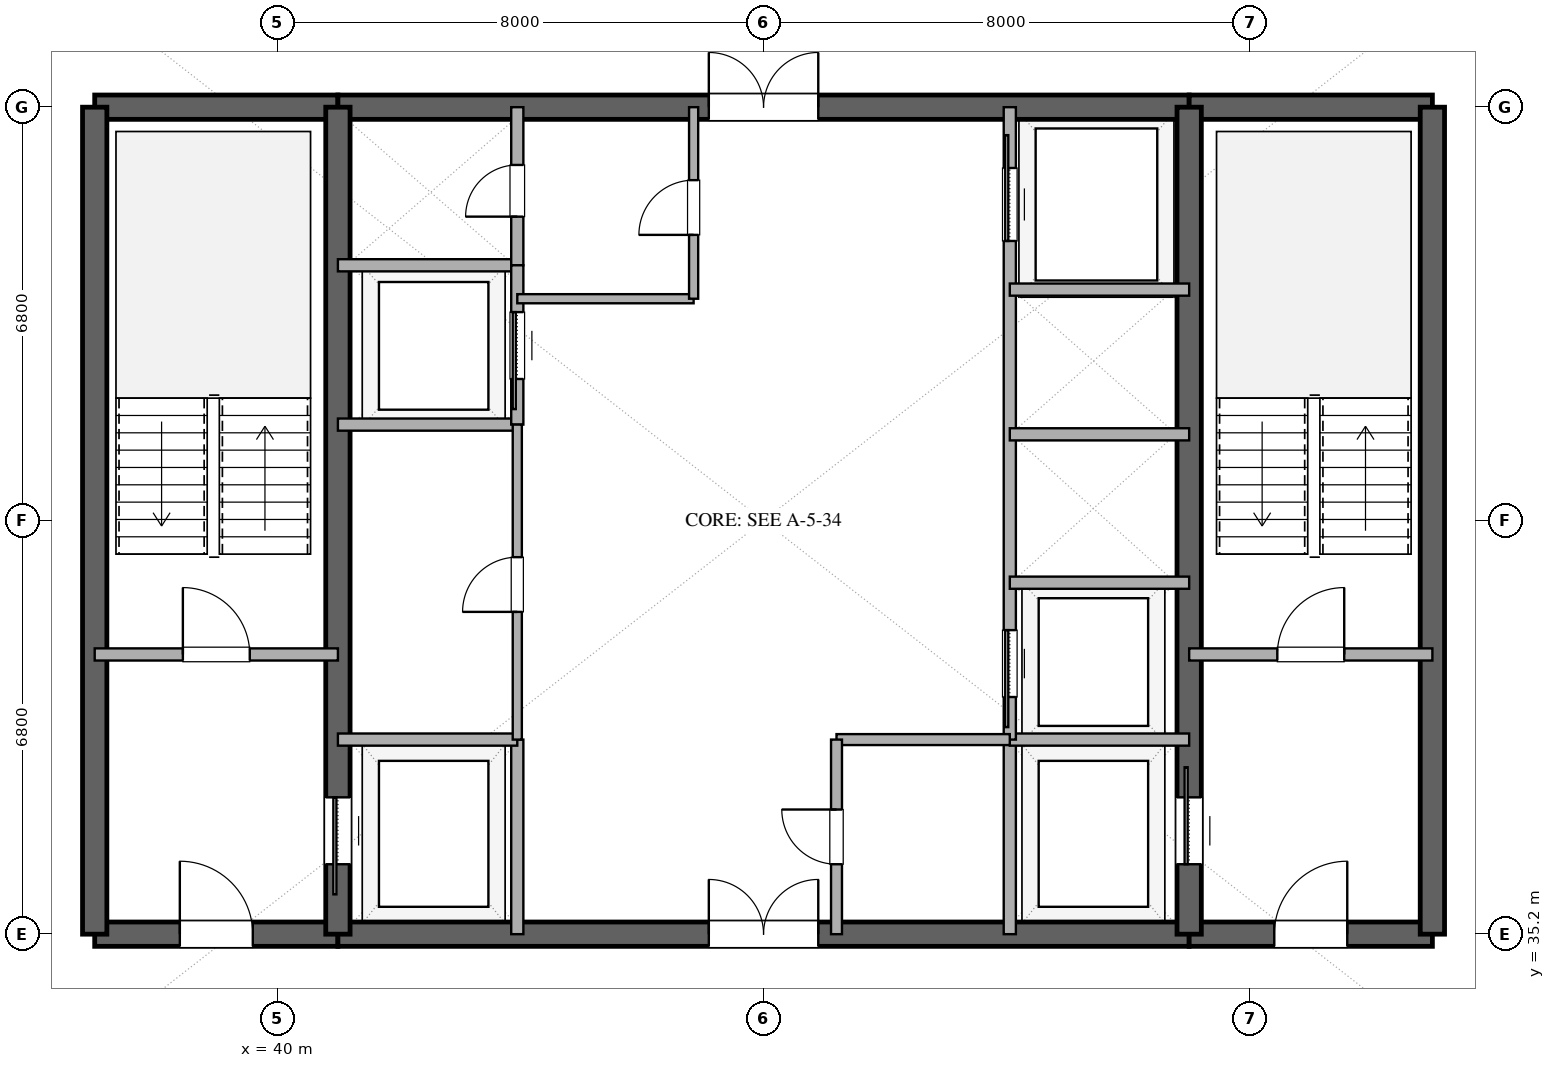
"""IFC4 building model, lengths in metres.
Left out: names, types, materials, properties, quantities, classifications, styles, units other than length and angle.
Written with IfcOpenShell. Run it as: python <this file> out.ifc"""

import sys

from ifc_helpers import new_model, si_unit, direction, frame, frame_2d, origin, place, context, subcontext, project, spatial, rectangle, extrude, element, fill, save


model = new_model("IFC4")
c1 = context("Model", 3, precision=1e-05, world=origin(), true_north=direction((0.0, 1.0)))
c2 = subcontext(c1, "Body", "Model", "MODEL_VIEW")
j1 = project(units=[si_unit("LENGTHUNIT", "METRE"), si_unit("PLANEANGLEUNIT", "RADIAN")], contexts=[c1])
p1 = place(None, origin())
s1 = spatial("IfcSite", under=j1, at=p1, CompositionType="ELEMENT")
p2 = place(p1, origin())
s2 = spatial("IfcBuilding", under=s1, at=p2, CompositionType="ELEMENT")
p3 = place(p2, frame((0.0, 0.0, 231.6)))
s3 = spatial("IfcBuildingStorey", under=s2, at=p3, CompositionType="ELEMENT", Elevation=231.6)
p4 = place(p3, frame((37.0, 35.2, 0.0), z_axis=(0.0, 0.0, 1.0), x_axis=(1.0, 0.0, 0.0)))
e1 = element("IfcWall", 1, at=p4, inside=s3, PredefinedType="SHEAR", context=c2, shape_type="SweptSolid", body=[
    extrude(rectangle(XDim=4.0, YDim=0.4, at=frame_2d((2.0, 0.0))), origin(), (0.0, 0.0, 1.0), 3.36),
])
p5 = place(p4, frame((1.4, 0.0, 0.0)))
e2 = element("IfcOpeningElement", 2, at=p5, cuts=e1, PredefinedType="OPENING", context=c2, shape_type="SweptSolid", body=[
    extrude(rectangle(XDim=1.2, YDim=2.15, at=frame_2d((0.6, 1.075))), frame((0.0, 0.21, 0.0), z_axis=(0.0, -1.0, 0.0), x_axis=(1.0, 0.0, 0.0)), (0.0, 0.0, 1.0), 0.42),
])
p6 = place(p3, frame((41.0, 35.2, 0.0), z_axis=(0.0, 0.0, 1.0), x_axis=(1.0, 0.0, 0.0)))
e3 = element("IfcWall", 3, at=p6, inside=s3, PredefinedType="SHEAR", context=c2, shape_type="SweptSolid", body=[
    extrude(rectangle(XDim=14.0, YDim=0.4, at=frame_2d((7.0, 0.0))), origin(), (0.0, 0.0, 1.0), 3.36),
])
p7 = place(p6, frame((6.1, 0.0, 0.0)))
e4 = element("IfcOpeningElement", 4, at=p7, cuts=e3, PredefinedType="OPENING", context=c2, shape_type="SweptSolid", body=[
    extrude(rectangle(XDim=1.8, YDim=2.25, at=frame_2d((0.9, 1.125))), frame((0.0, 0.21, 0.0), z_axis=(0.0, -1.0, 0.0), x_axis=(1.0, 0.0, 0.0)), (0.0, 0.0, 1.0), 0.42),
])
p8 = place(p3, frame((55.0, 35.2, 0.0), z_axis=(0.0, 0.0, 1.0), x_axis=(1.0, 0.0, 0.0)))
e5 = element("IfcWall", 5, at=p8, inside=s3, PredefinedType="SHEAR", context=c2, shape_type="SweptSolid", body=[
    extrude(rectangle(XDim=4.0, YDim=0.4, at=frame_2d((2.0, 0.0))), origin(), (0.0, 0.0, 1.0), 3.36),
])
p9 = place(p8, frame((1.4, 0.0, 0.0)))
e6 = element("IfcOpeningElement", 6, at=p9, cuts=e5, PredefinedType="OPENING", context=c2, shape_type="SweptSolid", body=[
    extrude(rectangle(XDim=1.2, YDim=2.15, at=frame_2d((0.6, 1.075))), frame((0.0, 0.21, 0.0), z_axis=(0.0, -1.0, 0.0), x_axis=(1.0, 0.0, 0.0)), (0.0, 0.0, 1.0), 0.42),
])
p10 = place(p3, frame((37.0, 48.8, 0.0), z_axis=(0.0, 0.0, 1.0), x_axis=(1.0, 0.0, 0.0)))
e7 = element("IfcWall", 7, at=p10, inside=s3, PredefinedType="SHEAR", context=c2, shape_type="SweptSolid", body=[
    extrude(rectangle(XDim=4.0, YDim=0.4, at=frame_2d((2.0, 0.0))), origin(), (0.0, 0.0, 1.0), 3.36),
])
p11 = place(p3, frame((41.0, 48.8, 0.0), z_axis=(0.0, 0.0, 1.0), x_axis=(1.0, 0.0, 0.0)))
e8 = element("IfcWall", 8, at=p11, inside=s3, PredefinedType="SHEAR", context=c2, shape_type="SweptSolid", body=[
    extrude(rectangle(XDim=14.0, YDim=0.4, at=frame_2d((7.0, 0.0))), origin(), (0.0, 0.0, 1.0), 3.36),
])
p12 = place(p11, frame((6.1, 0.0, 0.0)))
e9 = element("IfcOpeningElement", 9, at=p12, cuts=e8, PredefinedType="OPENING", context=c2, shape_type="SweptSolid", body=[
    extrude(rectangle(XDim=1.8, YDim=2.25, at=frame_2d((0.9, 1.125))), frame((0.0, 0.21, 0.0), z_axis=(0.0, -1.0, 0.0), x_axis=(1.0, 0.0, 0.0)), (0.0, 0.0, 1.0), 0.42),
])
p13 = place(p3, frame((55.0, 48.8, 0.0), z_axis=(0.0, 0.0, 1.0), x_axis=(1.0, 0.0, 0.0)))
e10 = element("IfcWall", 10, at=p13, inside=s3, PredefinedType="SHEAR", context=c2, shape_type="SweptSolid", body=[
    extrude(rectangle(XDim=4.0, YDim=0.4, at=frame_2d((2.0, 0.0))), origin(), (0.0, 0.0, 1.0), 3.36),
])
for number, where, z_axis, x_axis in (
    (11, (37.0, 35.2, 0.0), (0.0, 0.0, 1.0), (0.0, 1.0, 0.0)),
    (12, (59.0, 35.2, 0.0), (0.0, 0.0, 1.0), (0.0, 1.0, 0.0)),
):
    element("IfcWall", number, at=place(p3, frame(where, z_axis=z_axis, x_axis=x_axis)), inside=s3, PredefinedType="SHEAR", context=c2, shape_type="SweptSolid", body=[
        extrude(rectangle(XDim=13.6, YDim=0.4, at=frame_2d((6.8, 0.0))), origin(), (0.0, 0.0, 1.0), 3.36),
    ])
p14 = place(p3, frame((41.0, 35.2, 0.0), z_axis=(0.0, 0.0, 1.0), x_axis=(0.0, 1.0, 0.0)))
e13 = element("IfcWall", 13, at=p14, inside=s3, PredefinedType="SHEAR", context=c2, shape_type="SweptSolid", body=[
    extrude(rectangle(XDim=13.6, YDim=0.4, at=frame_2d((6.8, 0.0))), origin(), (0.0, 0.0, 1.0), 3.36),
])
p15 = place(p14, frame((1.15, 0.0, 0.0)))
e14 = element("IfcOpeningElement", 14, at=p15, cuts=e13, PredefinedType="OPENING", context=c2, shape_type="SweptSolid", body=[
    extrude(rectangle(XDim=1.1, YDim=2.2, at=frame_2d((0.55, 1.1))), frame((0.0, 0.21, 0.0), z_axis=(0.0, -1.0, 0.0), x_axis=(1.0, 0.0, 0.0)), (0.0, 0.0, 1.0), 0.42),
])
p16 = place(p3, frame((55.0, 35.2, 0.0), z_axis=(0.0, 0.0, 1.0), x_axis=(0.0, 1.0, 0.0)))
e15 = element("IfcWall", 15, at=p16, inside=s3, PredefinedType="SHEAR", context=c2, shape_type="SweptSolid", body=[
    extrude(rectangle(XDim=13.6, YDim=0.4, at=frame_2d((6.8, 0.0))), origin(), (0.0, 0.0, 1.0), 3.36),
])
p17 = place(p16, frame((1.15, 0.0, 0.0)))
e16 = element("IfcOpeningElement", 16, at=p17, cuts=e15, PredefinedType="OPENING", context=c2, shape_type="SweptSolid", body=[
    extrude(rectangle(XDim=1.1, YDim=2.2, at=frame_2d((0.55, 1.1))), frame((0.0, 0.21, 0.0), z_axis=(0.0, -1.0, 0.0), x_axis=(1.0, 0.0, 0.0)), (0.0, 0.0, 1.0), 0.42),
])
p18 = place(p3, frame((37.0, 39.8, 0.0), z_axis=(0.0, 0.0, 1.0), x_axis=(1.0, 0.0, 0.0)))
e17 = element("IfcWall", 17, at=p18, inside=s3, PredefinedType="SOLIDWALL", context=c2, shape_type="SweptSolid", body=[
    extrude(rectangle(XDim=4.0, YDim=0.2, at=frame_2d((2.0, 0.0))), origin(), (0.0, 0.0, 1.0), 2.72),
])
p19 = place(p18, frame((1.45, 0.0, 0.0)))
e18 = element("IfcOpeningElement", 18, at=p19, cuts=e17, PredefinedType="OPENING", context=c2, shape_type="SweptSolid", body=[
    extrude(rectangle(XDim=1.1, YDim=2.15, at=frame_2d((0.55, 1.075))), frame((0.0, 0.11, 0.0), z_axis=(0.0, -1.0, 0.0), x_axis=(1.0, 0.0, 0.0)), (0.0, 0.0, 1.0), 0.22),
])
p20 = place(p3, frame((55.0, 39.8, 0.0), z_axis=(0.0, 0.0, 1.0), x_axis=(1.0, 0.0, 0.0)))
e19 = element("IfcWall", 19, at=p20, inside=s3, PredefinedType="SOLIDWALL", context=c2, shape_type="SweptSolid", body=[
    extrude(rectangle(XDim=4.0, YDim=0.2, at=frame_2d((2.0, 0.0))), origin(), (0.0, 0.0, 1.0), 2.72),
])
p21 = place(p20, frame((1.45, 0.0, 0.0)))
e20 = element("IfcOpeningElement", 20, at=p21, cuts=e19, PredefinedType="OPENING", context=c2, shape_type="SweptSolid", body=[
    extrude(rectangle(XDim=1.1, YDim=2.15, at=frame_2d((0.55, 1.075))), frame((0.0, 0.11, 0.0), z_axis=(0.0, -1.0, 0.0), x_axis=(1.0, 0.0, 0.0)), (0.0, 0.0, 1.0), 0.22),
])
p22 = place(p3, frame((43.95, 35.2, 0.0), z_axis=(0.0, 0.0, 1.0), x_axis=(0.0, 1.0, 0.0)))
e21 = element("IfcWall", 21, at=p22, inside=s3, PredefinedType="SOLIDWALL", context=c2, shape_type="SweptSolid", body=[
    extrude(rectangle(XDim=3.2, YDim=0.2, at=frame_2d((1.6, 0.0))), origin(), (0.0, 0.0, 1.0), 2.72),
])
p23 = place(p3, frame((41.0, 38.4, 0.0), z_axis=(0.0, 0.0, 1.0), x_axis=(1.0, 0.0, 0.0)))
e22 = element("IfcWall", 22, at=p23, inside=s3, PredefinedType="SOLIDWALL", context=c2, shape_type="SweptSolid", body=[
    extrude(rectangle(XDim=2.95, YDim=0.2, at=frame_2d((1.475, 0.0))), origin(), (0.0, 0.0, 1.0), 2.72),
])
p24 = place(p3, frame((52.05, 35.2, 0.0), z_axis=(0.0, 0.0, 1.0), x_axis=(0.0, 1.0, 0.0)))
e23 = element("IfcWall", 23, at=p24, inside=s3, PredefinedType="SOLIDWALL", context=c2, shape_type="SweptSolid", body=[
    extrude(rectangle(XDim=3.2, YDim=0.2, at=frame_2d((1.6, 0.0))), origin(), (0.0, 0.0, 1.0), 2.72),
])
for number, where, z_axis, x_axis in (
    (24, (52.05, 38.4, 0.0), (0.0, 0.0, 1.0), (1.0, 0.0, 0.0)),
    (25, (41.0, 46.2, 0.0), (0.0, 0.0, 1.0), (1.0, 0.0, 0.0)),
):
    element("IfcWall", number, at=place(p3, frame(where, z_axis=z_axis, x_axis=x_axis)), inside=s3, PredefinedType="SOLIDWALL", context=c2, shape_type="SweptSolid", body=[
        extrude(rectangle(XDim=2.95, YDim=0.2, at=frame_2d((1.475, 0.0))), origin(), (0.0, 0.0, 1.0), 2.72),
    ])
p25 = place(p3, frame((43.95, 46.2, 0.0), z_axis=(0.0, 0.0, 1.0), x_axis=(0.0, 1.0, 0.0)))
e26 = element("IfcWall", 26, at=p25, inside=s3, PredefinedType="SOLIDWALL", context=c2, shape_type="SweptSolid", body=[
    extrude(rectangle(XDim=2.6, YDim=0.2, at=frame_2d((1.3, 0.0))), origin(), (0.0, 0.0, 1.0), 2.72),
])
p26 = place(p25, frame((0.8, 0.0, 0.0)))
e27 = element("IfcOpeningElement", 27, at=p26, cuts=e26, PredefinedType="OPENING", context=c2, shape_type="SweptSolid", body=[
    extrude(rectangle(XDim=0.85, YDim=2.15, at=frame_2d((0.425, 1.075))), frame((0.0, 0.11, 0.0), z_axis=(0.0, -1.0, 0.0), x_axis=(1.0, 0.0, 0.0)), (0.0, 0.0, 1.0), 0.22),
])
p27 = place(p3, frame((41.0, 43.58, 0.0), z_axis=(0.0, 0.0, 1.0), x_axis=(1.0, 0.0, 0.0)))
e28 = element("IfcWall", 28, at=p27, inside=s3, PredefinedType="SOLIDWALL", context=c2, shape_type="SweptSolid", body=[
    extrude(rectangle(XDim=2.95, YDim=0.2, at=frame_2d((1.475, 0.0))), origin(), (0.0, 0.0, 1.0), 2.72),
])
p28 = place(p3, frame((43.95, 43.58, 0.0), z_axis=(0.0, 0.0, 1.0), x_axis=(0.0, 1.0, 0.0)))
e29 = element("IfcWall", 29, at=p28, inside=s3, PredefinedType="SOLIDWALL", context=c2, shape_type="SweptSolid", body=[
    extrude(rectangle(XDim=2.62, YDim=0.2, at=frame_2d((1.31, 0.0))), origin(), (0.0, 0.0, 1.0), 2.72),
])
p29 = place(p28, frame((0.75, 0.0, 0.0)))
e30 = element("IfcOpeningElement", 30, at=p29, cuts=e29, PredefinedType="OPENING", context=c2, shape_type="SweptSolid", body=[
    extrude(rectangle(XDim=1.1, YDim=2.2, at=frame_2d((0.55, 1.1))), frame((0.0, 0.11, 0.0), z_axis=(0.0, -1.0, 0.0), x_axis=(1.0, 0.0, 0.0)), (0.0, 0.0, 1.0), 0.22),
])
p30 = place(p3, frame((43.95, 38.4, 0.0), z_axis=(0.0, 0.0, 1.0), x_axis=(0.0, 1.0, 0.0)))
e31 = element("IfcWall", 31, at=p30, inside=s3, PredefinedType="PARTITIONING", context=c2, shape_type="SweptSolid", body=[
    extrude(rectangle(XDim=5.18, YDim=0.15, at=frame_2d((2.59, 0.0))), origin(), (0.0, 0.0, 1.0), 2.72),
])
p31 = place(p30, frame((2.1, 0.0, 0.0)))
e32 = element("IfcOpeningElement", 32, at=p31, cuts=e31, PredefinedType="OPENING", context=c2, shape_type="SweptSolid", body=[
    extrude(rectangle(XDim=0.9, YDim=2.15, at=frame_2d((0.45, 1.075))), frame((0.0, 0.085, 0.0), z_axis=(0.0, -1.0, 0.0), x_axis=(1.0, 0.0, 0.0)), (0.0, 0.0, 1.0), 0.17),
])
p32 = place(p3, frame((52.05, 38.4, 0.0), z_axis=(0.0, 0.0, 1.0), x_axis=(0.0, 1.0, 0.0)))
e33 = element("IfcWall", 33, at=p32, inside=s3, PredefinedType="SOLIDWALL", context=c2, shape_type="SweptSolid", body=[
    extrude(rectangle(XDim=10.4, YDim=0.2, at=frame_2d((5.2, 0.0))), origin(), (0.0, 0.0, 1.0), 2.72),
])
p33 = place(p32, frame((0.7, 0.0, 0.0)))
e34 = element("IfcOpeningElement", 34, at=p33, cuts=e33, PredefinedType="OPENING", context=c2, shape_type="SweptSolid", body=[
    extrude(rectangle(XDim=1.1, YDim=2.2, at=frame_2d((0.55, 1.1))), frame((0.0, 0.11, 0.0), z_axis=(0.0, -1.0, 0.0), x_axis=(1.0, 0.0, 0.0)), (0.0, 0.0, 1.0), 0.22),
])
p34 = place(p32, frame((8.2, 0.0, 0.0)))
e35 = element("IfcOpeningElement", 35, at=p34, cuts=e33, PredefinedType="OPENING", context=c2, shape_type="SweptSolid", body=[
    extrude(rectangle(XDim=1.2, YDim=2.2, at=frame_2d((0.6, 1.1))), frame((0.0, 0.11, 0.0), z_axis=(0.0, -1.0, 0.0), x_axis=(1.0, 0.0, 0.0)), (0.0, 0.0, 1.0), 0.22),
])
for number, where, z_axis, x_axis in (
    (36, (52.05, 40.98, 0.0), (0.0, 0.0, 1.0), (1.0, 0.0, 0.0)),
    (37, (52.05, 43.42, 0.0), (0.0, 0.0, 1.0), (1.0, 0.0, 0.0)),
    (38, (52.05, 45.8, 0.0), (0.0, 0.0, 1.0), (1.0, 0.0, 0.0)),
):
    element("IfcWall", number, at=place(p3, frame(where, z_axis=z_axis, x_axis=x_axis)), inside=s3, PredefinedType="SOLIDWALL", context=c2, shape_type="SweptSolid", body=[
        extrude(rectangle(XDim=2.95, YDim=0.2, at=frame_2d((1.475, 0.0))), origin(), (0.0, 0.0, 1.0), 2.72),
    ])
p35 = place(p3, frame((43.95, 45.65, 0.0), z_axis=(0.0, 0.0, 1.0), x_axis=(1.0, 0.0, 0.0)))
e39 = element("IfcWall", 39, at=p35, inside=s3, PredefinedType="PARTITIONING", context=c2, shape_type="SweptSolid", body=[
    extrude(rectangle(XDim=2.9, YDim=0.15, at=frame_2d((1.45, 0.0))), origin(), (0.0, 0.0, 1.0), 2.72),
])
p36 = place(p3, frame((46.85, 45.65, 0.0), z_axis=(0.0, 0.0, 1.0), x_axis=(0.0, 1.0, 0.0)))
e40 = element("IfcWall", 40, at=p36, inside=s3, PredefinedType="PARTITIONING", context=c2, shape_type="SweptSolid", body=[
    extrude(rectangle(XDim=3.15, YDim=0.15, at=frame_2d((1.575, 0.0))), origin(), (0.0, 0.0, 1.0), 2.72),
])
p37 = place(p36, frame((1.05, 0.0, 0.0)))
e41 = element("IfcOpeningElement", 41, at=p37, cuts=e40, PredefinedType="OPENING", context=c2, shape_type="SweptSolid", body=[
    extrude(rectangle(XDim=0.9, YDim=2.15, at=frame_2d((0.45, 1.075))), frame((0.0, 0.085, 0.0), z_axis=(0.0, -1.0, 0.0), x_axis=(1.0, 0.0, 0.0)), (0.0, 0.0, 1.0), 0.17),
])
p38 = place(p3, frame((49.2, 38.4, 0.0), z_axis=(0.0, 0.0, 1.0), x_axis=(1.0, 0.0, 0.0)))
e42 = element("IfcWall", 42, at=p38, inside=s3, PredefinedType="PLUMBINGWALL", context=c2, shape_type="SweptSolid", body=[
    extrude(rectangle(XDim=2.85, YDim=0.18, at=frame_2d((1.425, 0.0))), origin(), (0.0, 0.0, 1.0), 2.72),
])
p39 = place(p3, frame((49.2, 35.2, 0.0), z_axis=(0.0, 0.0, 1.0), x_axis=(0.0, 1.0, 0.0)))
e43 = element("IfcWall", 43, at=p39, inside=s3, PredefinedType="PLUMBINGWALL", context=c2, shape_type="SweptSolid", body=[
    extrude(rectangle(XDim=3.2, YDim=0.18, at=frame_2d((1.6, 0.0))), origin(), (0.0, 0.0, 1.0), 2.72),
])
p40 = place(p39, frame((1.15, 0.0, 0.0)))
e44 = element("IfcOpeningElement", 44, at=p40, cuts=e43, PredefinedType="OPENING", context=c2, shape_type="SweptSolid", body=[
    extrude(rectangle(XDim=0.9, YDim=2.1, at=frame_2d((0.45, 1.05))), frame((0.0, 0.1, 0.0), z_axis=(0.0, -1.0, 0.0), x_axis=(1.0, 0.0, 0.0)), (0.0, 0.0, 1.0), 0.2),
])
p41 = place(p15, origin())
e45 = element("IfcDoor", 45, at=p41, inside=s3, OperationType="SLIDING_TO_LEFT", PredefinedType="DOOR", context=c2, shape_type="SweptSolid", body=[
    extrude(rectangle(XDim=1.1, YDim=2.2, at=frame_2d((0.55, 1.1))), frame((0.0, 0.025, 0.0), z_axis=(0.0, -1.0, 0.0), x_axis=(1.0, 0.0, 0.0)), (0.0, 0.0, 1.0), 0.05),
])
fill(e14, e45)
p42 = place(p17, origin())
e46 = element("IfcDoor", 46, at=p42, inside=s3, OperationType="SLIDING_TO_RIGHT", PredefinedType="DOOR", context=c2, shape_type="SweptSolid", body=[
    extrude(rectangle(XDim=1.1, YDim=2.2, at=frame_2d((0.55, 1.1))), frame((0.0, 0.025, 0.0), z_axis=(0.0, -1.0, 0.0), x_axis=(1.0, 0.0, 0.0)), (0.0, 0.0, 1.0), 0.05),
])
fill(e16, e46)
p43 = place(p5, origin())
e47 = element("IfcDoor", 47, at=p43, inside=s3, OperationType="SINGLE_SWING_LEFT", PredefinedType="DOOR", context=c2, shape_type="SweptSolid", body=[
    extrude(rectangle(XDim=1.2, YDim=2.15, at=frame_2d((0.6, 1.075))), frame((0.0, 0.025, 0.0), z_axis=(0.0, -1.0, 0.0), x_axis=(1.0, 0.0, 0.0)), (0.0, 0.0, 1.0), 0.05),
])
fill(e2, e47)
p44 = place(p9, origin())
e48 = element("IfcDoor", 48, at=p44, inside=s3, OperationType="SINGLE_SWING_RIGHT", PredefinedType="DOOR", context=c2, shape_type="SweptSolid", body=[
    extrude(rectangle(XDim=1.2, YDim=2.15, at=frame_2d((0.6, 1.075))), frame((0.0, 0.025, 0.0), z_axis=(0.0, -1.0, 0.0), x_axis=(1.0, 0.0, 0.0)), (0.0, 0.0, 1.0), 0.05),
])
fill(e6, e48)
p45 = place(p7, origin())
e49 = element("IfcDoor", 49, at=p45, inside=s3, OperationType="DOUBLE_DOOR_SINGLE_SWING", PredefinedType="DOOR", context=c2, shape_type="SweptSolid", body=[
    extrude(rectangle(XDim=1.8, YDim=2.25, at=frame_2d((0.9, 1.125))), frame((0.0, 0.025, 0.0), z_axis=(0.0, -1.0, 0.0), x_axis=(1.0, 0.0, 0.0)), (0.0, 0.0, 1.0), 0.05),
])
fill(e4, e49)
p46 = place(p12, origin())
e50 = element("IfcDoor", 50, at=p46, inside=s3, OperationType="DOUBLE_DOOR_SINGLE_SWING", PredefinedType="DOOR", context=c2, shape_type="SweptSolid", body=[
    extrude(rectangle(XDim=1.8, YDim=2.25, at=frame_2d((0.9, 1.125))), frame((0.0, 0.025, 0.0), z_axis=(0.0, -1.0, 0.0), x_axis=(1.0, 0.0, 0.0)), (0.0, 0.0, 1.0), 0.05),
])
fill(e9, e50)
p47 = place(p19, origin())
e51 = element("IfcDoor", 51, at=p47, inside=s3, OperationType="SINGLE_SWING_LEFT", PredefinedType="DOOR", context=c2, shape_type="SweptSolid", body=[
    extrude(rectangle(XDim=1.1, YDim=2.15, at=frame_2d((0.55, 1.075))), frame((0.0, 0.025, 0.0), z_axis=(0.0, -1.0, 0.0), x_axis=(1.0, 0.0, 0.0)), (0.0, 0.0, 1.0), 0.05),
])
fill(e18, e51)
p48 = place(p21, origin())
e52 = element("IfcDoor", 52, at=p48, inside=s3, OperationType="SINGLE_SWING_RIGHT", PredefinedType="DOOR", context=c2, shape_type="SweptSolid", body=[
    extrude(rectangle(XDim=1.1, YDim=2.15, at=frame_2d((0.55, 1.075))), frame((0.0, 0.025, 0.0), z_axis=(0.0, -1.0, 0.0), x_axis=(1.0, 0.0, 0.0)), (0.0, 0.0, 1.0), 0.05),
])
fill(e20, e52)
p49 = place(p26, origin())
e53 = element("IfcDoor", 53, at=p49, inside=s3, OperationType="SINGLE_SWING_LEFT", PredefinedType="DOOR", context=c2, shape_type="SweptSolid", body=[
    extrude(rectangle(XDim=0.85, YDim=2.15, at=frame_2d((0.425, 1.075))), frame((0.0, 0.025, 0.0), z_axis=(0.0, -1.0, 0.0), x_axis=(1.0, 0.0, 0.0)), (0.0, 0.0, 1.0), 0.05),
])
fill(e27, e53)
p50 = place(p29, origin())
e54 = element("IfcDoor", 54, at=p50, inside=s3, OperationType="SLIDING_TO_LEFT", PredefinedType="DOOR", context=c2, shape_type="SweptSolid", body=[
    extrude(rectangle(XDim=1.1, YDim=2.2, at=frame_2d((0.55, 1.1))), frame((0.0, 0.025, 0.0), z_axis=(0.0, -1.0, 0.0), x_axis=(1.0, 0.0, 0.0)), (0.0, 0.0, 1.0), 0.05),
])
fill(e30, e54)
p51 = place(p31, origin())
e55 = element("IfcDoor", 55, at=p51, inside=s3, OperationType="SINGLE_SWING_LEFT", PredefinedType="DOOR", context=c2, shape_type="SweptSolid", body=[
    extrude(rectangle(XDim=0.9, YDim=2.15, at=frame_2d((0.45, 1.075))), frame((0.0, 0.025, 0.0), z_axis=(0.0, -1.0, 0.0), x_axis=(1.0, 0.0, 0.0)), (0.0, 0.0, 1.0), 0.05),
])
fill(e32, e55)
p52 = place(p33, origin())
e56 = element("IfcDoor", 56, at=p52, inside=s3, OperationType="SLIDING_TO_LEFT", PredefinedType="DOOR", context=c2, shape_type="SweptSolid", body=[
    extrude(rectangle(XDim=1.1, YDim=2.2, at=frame_2d((0.55, 1.1))), frame((0.0, 0.025, 0.0), z_axis=(0.0, -1.0, 0.0), x_axis=(1.0, 0.0, 0.0)), (0.0, 0.0, 1.0), 0.05),
])
fill(e34, e56)
p53 = place(p34, origin())
e57 = element("IfcDoor", 57, at=p53, inside=s3, OperationType="SLIDING_TO_RIGHT", PredefinedType="DOOR", context=c2, shape_type="SweptSolid", body=[
    extrude(rectangle(XDim=1.2, YDim=2.2, at=frame_2d((0.6, 1.1))), frame((0.0, 0.025, 0.0), z_axis=(0.0, -1.0, 0.0), x_axis=(1.0, 0.0, 0.0)), (0.0, 0.0, 1.0), 0.05),
])
fill(e35, e57)
p54 = place(p37, origin())
e58 = element("IfcDoor", 58, at=p54, inside=s3, OperationType="SINGLE_SWING_LEFT", PredefinedType="DOOR", context=c2, shape_type="SweptSolid", body=[
    extrude(rectangle(XDim=0.9, YDim=2.15, at=frame_2d((0.45, 1.075))), frame((0.0, 0.025, 0.0), z_axis=(0.0, -1.0, 0.0), x_axis=(1.0, 0.0, 0.0)), (0.0, 0.0, 1.0), 0.05),
])
fill(e41, e58)
p55 = place(p40, origin())
e59 = element("IfcDoor", 59, at=p55, inside=s3, OperationType="SINGLE_SWING_RIGHT", PredefinedType="DOOR", context=c2, shape_type="SweptSolid", body=[
    extrude(rectangle(XDim=0.9, YDim=2.1, at=frame_2d((0.45, 1.05))), frame((0.0, 0.025, 0.0), z_axis=(0.0, -1.0, 0.0), x_axis=(1.0, 0.0, 0.0)), (0.0, 0.0, 1.0), 0.05),
])
fill(e44, e59)
save(model, sys.argv[1])
